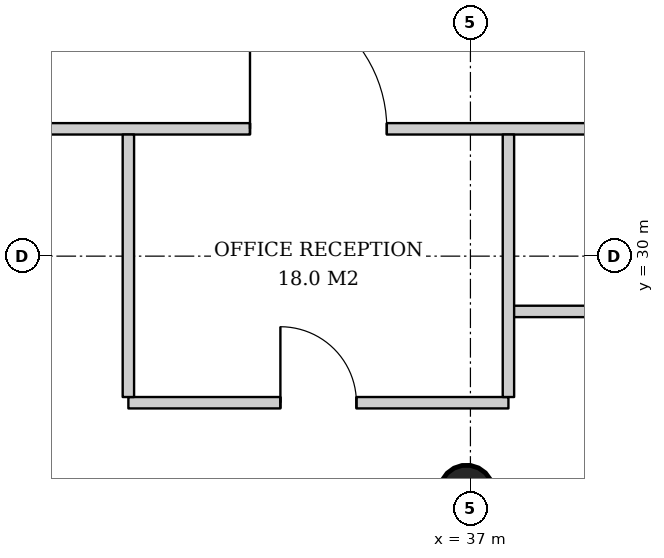
"""IFC4 building model, lengths in metres.
Left out: names, types, materials, properties, quantities, classifications, styles, units other than length and angle.
Written with IfcOpenShell. Run it as: python <this file> out.ifc"""

import sys

from ifc_helpers import new_model, si_unit, direction, frame, frame_2d, origin, origin_2d, place, context, subcontext, project, spatial, rectangle, hollow_circle, extrude, element, fill, save


model = new_model("IFC4")
c1 = context("Model", 3, precision=1e-05, world=origin(), true_north=direction((0.0, 1.0)))
c2 = subcontext(c1, "Body", "Model", "MODEL_VIEW")
j1 = project(units=[si_unit("LENGTHUNIT", "METRE"), si_unit("PLANEANGLEUNIT", "RADIAN")], contexts=[c1])
p1 = place(None, origin())
s1 = spatial("IfcSite", under=j1, at=p1, CompositionType="ELEMENT")
p2 = place(p1, origin())
s2 = spatial("IfcBuilding", under=s1, at=p2, CompositionType="ELEMENT")
p3 = place(p2, frame((0.0, 0.0, 173.0)))
s3 = spatial("IfcBuildingStorey", under=s2, at=p3, CompositionType="ELEMENT", Elevation=173.0)
p4 = place(p3, frame((36.928, 26.857, 0.0), z_axis=(0.015987237665, 0.031910269556, 0.999362868496), x_axis=(-0.894067115991, 0.447933021895, 0.0)))
e1 = element("IfcColumn", 1, at=p4, inside=s3, PredefinedType="COLUMN", context=c2, shape_type="SweptSolid", body=[
    extrude(hollow_circle(Radius=0.355, WallThickness=0.025, at=origin_2d()), origin(), (0.0, 0.0, 1.0), 3.802),
])
p5 = place(p3, frame((30.971, 31.675, 0.0), z_axis=(0.0, 0.0, 1.0), x_axis=(1.0, 0.0, 0.0)))
e2 = element("IfcWall", 2, at=p5, inside=s3, PredefinedType="PARTITIONING", context=c2, shape_type="SweptSolid", body=[
    extrude(rectangle(XDim=28.057, YDim=0.15, at=frame_2d((14.029, 0.0))), origin(), (0.0, 0.0, 1.0), 2.867),
])
p6 = place(p5, frame((3.129, 0.0, 0.0)))
e3 = element("IfcOpeningElement", 3, at=p6, cuts=e2, PredefinedType="OPENING", context=c2, shape_type="SweptSolid", body=[
    extrude(rectangle(XDim=1.8, YDim=2.4, at=frame_2d((0.9, 1.2))), frame((0.0, 0.085, 0.0), z_axis=(0.0, -1.0, 0.0), x_axis=(1.0, 0.0, 0.0)), (0.0, 0.0, 1.0), 0.17),
])
p7 = place(p3, frame((32.5, 28.072, 0.0), z_axis=(0.0, 0.0, 1.0), x_axis=(1.0, 0.0, 0.0)))
e4 = element("IfcWall", 4, at=p7, inside=s3, PredefinedType="PARTITIONING", context=c2, shape_type="SweptSolid", body=[
    extrude(rectangle(XDim=5.0, YDim=0.15, at=frame_2d((2.5, 0.0))), origin(), (0.0, 0.0, 1.0), 2.92),
])
p8 = place(p7, frame((2.0, 0.0, 0.0)))
e5 = element("IfcOpeningElement", 5, at=p8, cuts=e4, PredefinedType="OPENING", context=c2, shape_type="SweptSolid", body=[
    extrude(rectangle(XDim=1.0, YDim=2.1, at=frame_2d((0.5, 1.05))), frame((0.0, 0.085, 0.0), z_axis=(0.0, -1.0, 0.0), x_axis=(1.0, 0.0, 0.0)), (0.0, 0.0, 1.0), 0.17),
])
p9 = place(p3, frame((37.5, 29.273, 0.0), z_axis=(0.0, 0.0, 1.0), x_axis=(1.0, 0.0, 0.0)))
e6 = element("IfcWall", 6, at=p9, inside=s3, PredefinedType="PARTITIONING", context=c2, shape_type="SweptSolid", body=[
    extrude(rectangle(XDim=5.0, YDim=0.15, at=frame_2d((2.5, 0.0))), origin(), (0.0, 0.0, 1.0), 2.867),
])
p10 = place(p9, frame((2.0, 0.0, 0.0)))
e7 = element("IfcOpeningElement", 7, at=p10, cuts=e6, PredefinedType="OPENING", context=c2, shape_type="SweptSolid", body=[
    extrude(rectangle(XDim=1.0, YDim=2.1, at=frame_2d((0.5, 1.05))), frame((0.0, 0.085, 0.0), z_axis=(0.0, -1.0, 0.0), x_axis=(1.0, 0.0, 0.0)), (0.0, 0.0, 1.0), 0.17),
])
p11 = place(p3, frame((32.5, 31.6, 0.0), z_axis=(0.0, 0.0, 1.0), x_axis=(0.0, -1.0, 0.0)))
e8 = element("IfcWall", 8, at=p11, inside=s3, PredefinedType="PARTITIONING", context=c2, shape_type="SweptSolid", body=[
    extrude(rectangle(XDim=3.454, YDim=0.15, at=frame_2d((1.727, 0.0))), origin(), (0.0, 0.0, 1.0), 3.22),
])
p12 = place(p3, frame((37.5, 31.6, 0.0), z_axis=(0.0, 0.0, 1.0), x_axis=(0.0, -1.0, 0.0)))
e9 = element("IfcWall", 9, at=p12, inside=s3, PredefinedType="PARTITIONING", context=c2, shape_type="SweptSolid", body=[
    extrude(rectangle(XDim=3.454, YDim=0.15, at=frame_2d((1.727, 0.0))), origin(), (0.0, 0.0, 1.0), 3.62),
])
p13 = place(p6, origin())
e10 = element("IfcDoor", 10, at=p13, inside=s3, OperationType="DOUBLE_DOOR_SINGLE_SWING", PredefinedType="DOOR", context=c2, shape_type="SweptSolid", body=[
    extrude(rectangle(XDim=1.8, YDim=2.4, at=frame_2d((0.9, 1.2))), frame((0.0, 0.025, 0.0), z_axis=(0.0, -1.0, 0.0), x_axis=(1.0, 0.0, 0.0)), (0.0, 0.0, 1.0), 0.05),
])
fill(e3, e10)
p14 = place(p8, origin())
e11 = element("IfcDoor", 11, at=p14, inside=s3, OperationType="SINGLE_SWING_LEFT", PredefinedType="DOOR", context=c2, shape_type="SweptSolid", body=[
    extrude(rectangle(XDim=1.0, YDim=2.1, at=frame_2d((0.5, 1.05))), frame((0.0, 0.025, 0.0), z_axis=(0.0, -1.0, 0.0), x_axis=(1.0, 0.0, 0.0)), (0.0, 0.0, 1.0), 0.05),
])
fill(e5, e11)
save(model, sys.argv[1])
